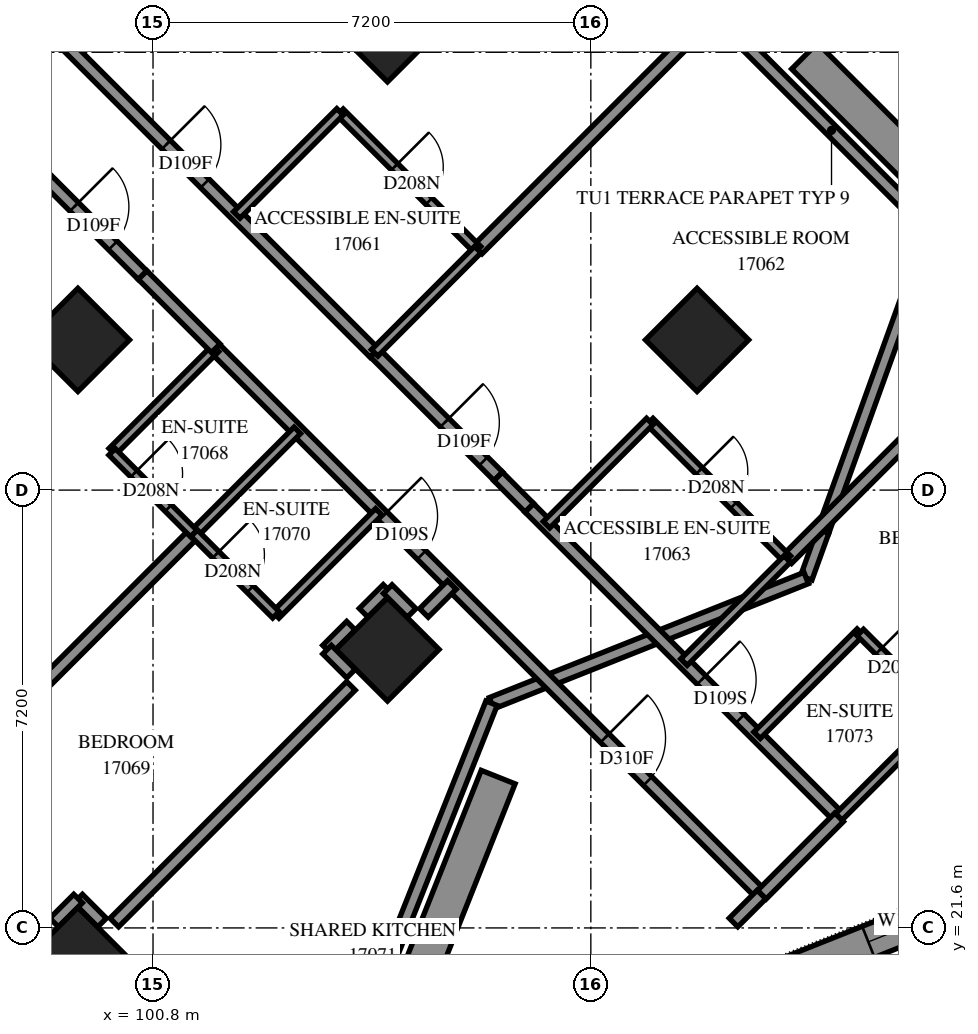
"""IFC4 building model, lengths in metres.
Left out: names, types, materials, properties, quantities, classifications, styles, units other than length and angle.
Written with IfcOpenShell. Run it as: python <this file> out.ifc"""

import sys

from ifc_helpers import new_model, si_unit, direction, frame, frame_2d, origin, origin_2d, place, context, subcontext, project, spatial, polyline, rectangle, outline, extrude, element, fill, save


model = new_model("IFC4")
c1 = context("Model", 3, precision=1e-05, world=origin(), true_north=direction((0.0, 1.0)))
c2 = subcontext(c1, "Body", "Model", "MODEL_VIEW")
j1 = project(units=[si_unit("LENGTHUNIT", "METRE"), si_unit("PLANEANGLEUNIT", "RADIAN")], contexts=[c1])
p1 = place(None, origin())
s1 = spatial("IfcSite", under=j1, at=p1, CompositionType="ELEMENT")
p2 = place(p1, origin())
s2 = spatial("IfcBuilding", under=s1, at=p2, CompositionType="ELEMENT")
p3 = place(p2, frame((0.0, 0.0, 64.4)))
s3 = spatial("IfcBuildingStorey", under=s2, at=p3, CompositionType="ELEMENT", Elevation=64.4)
for number, where, z_axis, x_axis in (
    (1, (104.656, 36.362, 0.0), (0.0, 0.0, 1.0), (0.707, -0.707, 0.0)),
    (2, (99.565, 31.271, 0.0), (0.0, 0.0, 1.0), (0.707, -0.707, 0.0)),
    (3, (109.747, 31.271, 0.0), (0.0, 0.0, 1.0), (0.707, -0.707, 0.0)),
    (4, (104.656, 26.18, 0.0), (0.0, 0.0, 1.0), (0.707, -0.707, 0.0)),
    (5, (99.565, 21.088, 0.0), (0.0, 0.0, 1.0), (0.707, -0.707, 0.0)),
):
    element("IfcColumn", number, at=place(p3, frame(where, z_axis=z_axis, x_axis=x_axis)), inside=s3, PredefinedType="COLUMN", context=c2, shape_type="SweptSolid", body=[
        extrude(rectangle(XDim=1.2, YDim=1.2, at=origin_2d()), origin(), (0.0, 0.0, 1.0), 3.1),
    ])
p4 = place(p3, frame((110.939, 20.724, 0.0), z_axis=(0.0, 0.0, 1.0), x_axis=(0.9291504333, 0.3697018694, 0.0)))
e6 = element("IfcWall", 6, at=p4, inside=s3, PredefinedType="SOLIDWALL", context=c2, shape_type="SweptSolid", body=[
    extrude(outline(polyline([(0.118, -0.275), (5.68, -0.275), (5.432, 0.275), (-0.118, 0.275), (0.118, -0.275)])), origin(), (0.0, 0.0, 1.0), 3.1),
])
p5 = place(p4, frame((1.749, 0.0, 0.7)))
e7 = element("IfcOpeningElement", 7, at=p5, cuts=e6, PredefinedType="OPENING", context=c2, shape_type="SweptSolid", body=[
    extrude(rectangle(XDim=1.8, YDim=2.0, at=frame_2d((0.9, 1.0))), frame((0.0, 0.285, 0.0), z_axis=(0.0, -1.0, 0.0), x_axis=(1.0, 0.0, 0.0)), (0.0, 0.0, 1.0), 0.57),
])
p6 = place(p3, frame((110.313, 36.362, 0.0), z_axis=(0.0, 0.0, 1.0), x_axis=(0.7070960376, -0.7071175246, 0.0)))
e8 = element("IfcWall", 8, at=p6, inside=s3, PredefinedType="PARAPET", context=c2, shape_type="SweptSolid", body=[
    extrude(outline(polyline([(-0.1, -0.1), (4.59, -0.1), (4.718, 0.1), (0.1, 0.1), (-0.1, -0.1)])), origin(), (0.0, 0.0, 1.0), 0.25),
])
p7 = place(p3, frame((113.239, 32.061, 0.0), z_axis=(0.0, 0.0, 1.0), x_axis=(-0.3392575143, -0.9406935415, 0.0)))
e9 = element("IfcWall", 9, at=p7, inside=s3, PredefinedType="PARAPET", context=c2, shape_type="SweptSolid", body=[
    extrude(outline(polyline([(0.0, -0.1), (4.185, -0.1), (4.185, 0.1), (0.0, 0.1), (0.0, -0.1)])), origin(), (0.0, 0.0, 1.0), 0.25),
])
p8 = place(p3, frame((111.819, 28.124, 0.0), z_axis=(0.0, 0.0, 1.0), x_axis=(-0.3392690321, -0.9406893876, 0.0)))
e10 = element("IfcWall", 10, at=p8, inside=s3, PredefinedType="PARAPET", context=c2, shape_type="SweptSolid", body=[
    extrude(outline(polyline([(0.0, -0.1), (0.773, -0.1), (0.863, 0.1), (0.0, 0.1), (0.0, -0.1)])), origin(), (0.0, 0.0, 1.0), 0.25),
])
p9 = place(p3, frame((111.542, 27.354, 0.0), z_axis=(0.0, 0.0, 1.0), x_axis=(-0.9291537819, -0.3696934536, 0.0)))
e11 = element("IfcWall", 11, at=p9, inside=s3, PredefinedType="PARAPET", context=c2, shape_type="SweptSolid", body=[
    extrude(outline(polyline([(0.045, -0.1), (5.612, -0.1), (5.526, 0.1), (-0.045, 0.1), (0.045, -0.1)])), origin(), (0.0, 0.0, 1.0), 0.25),
])
p10 = place(p3, frame((106.367, 25.295, 0.0), z_axis=(0.0, 0.0, 1.0), x_axis=(-0.3696779509, -0.92915995, 0.0)))
e12 = element("IfcWall", 12, at=p10, inside=s3, PredefinedType="PARAPET", context=c2, shape_type="SweptSolid", body=[
    extrude(outline(polyline([(-0.043, -0.1), (5.524, -0.1), (5.614, 0.1), (0.043, 0.1), (-0.043, -0.1)])), origin(), (0.0, 0.0, 1.0), 0.25),
])
p11 = place(p3, frame((111.515, 35.938, 0.0), z_axis=(0.0, 0.0, 1.0), x_axis=(0.7070914108, -0.7071221512, 0.0)))
e13 = element("IfcWall", 13, at=p11, inside=s3, PredefinedType="SOLIDWALL", context=c2, shape_type="SweptSolid", body=[
    extrude(rectangle(XDim=3.253, YDim=0.6, at=frame_2d((1.627, 0.0))), origin(), (0.0, 0.0, 1.0), 0.65),
])
p12 = place(p3, frame((106.476, 24.081, 0.0), z_axis=(0.0, 0.0, 1.0), x_axis=(-0.369669248, -0.9291634125, 0.0)))
e14 = element("IfcWall", 14, at=p12, inside=s3, PredefinedType="SOLIDWALL", context=c2, shape_type="SweptSolid", body=[
    extrude(rectangle(XDim=4.128, YDim=0.6, at=frame_2d((2.064, 0.0))), origin(), (0.0, 0.0, 1.0), 0.65),
])
p13 = place(p3, frame((101.825, 31.125, 0.0), z_axis=(0.0, 0.0, 1.0), x_axis=(0.7071067812, -0.7071067812, 0.0)))
e15 = element("IfcWall", 15, at=p13, inside=s3, PredefinedType="PARTITIONING", context=c2, shape_type="SweptSolid", body=[
    extrude(rectangle(XDim=12.7, YDim=0.2, at=frame_2d((6.35, 0.0))), origin(), (0.0, 0.0, 1.0), 3.1),
])
p14 = place(p13, frame((3.895, 0.0, 0.0)))
e16 = element("IfcOpeningElement", 16, at=p14, cuts=e15, PredefinedType="OPENING", context=c2, shape_type="SweptSolid", body=[
    extrude(rectangle(XDim=0.9, YDim=2.1, at=frame_2d((0.45, 1.05))), frame((0.0, 0.11, 0.0), z_axis=(0.0, -1.0, 0.0), x_axis=(1.0, 0.0, 0.0)), (0.0, 0.0, 1.0), 0.22),
])
p15 = place(p13, frame((9.056, 0.0, 0.0)))
e17 = element("IfcOpeningElement", 17, at=p15, cuts=e15, PredefinedType="OPENING", context=c2, shape_type="SweptSolid", body=[
    extrude(rectangle(XDim=1.0, YDim=2.1, at=frame_2d((0.5, 1.05))), frame((0.0, 0.11, 0.0), z_axis=(0.0, -1.0, 0.0), x_axis=(1.0, 0.0, 0.0)), (0.0, 0.0, 1.0), 0.22),
])
p16 = place(p3, frame((106.14, 32.756, 0.0), z_axis=(0.0, 0.0, 1.0), x_axis=(0.7071017366, 0.7071118258, 0.0)))
e18 = element("IfcWall", 18, at=p16, inside=s3, PredefinedType="PARTITIONING", context=c2, shape_type="SweptSolid", body=[
    extrude(rectangle(XDim=9.912, YDim=0.2, at=frame_2d((4.956, 0.0))), origin(), (0.0, 0.0, 1.0), 3.1),
])
p17 = place(p3, frame((99.349, 36.147, 0.0), z_axis=(0.0, 0.0, 1.0), x_axis=(0.7071067812, -0.7071067812, 0.0)))
e19 = element("IfcWall", 19, at=p17, inside=s3, PredefinedType="PARTITIONING", context=c2, shape_type="SweptSolid", body=[
    extrude(rectangle(XDim=7.201, YDim=0.2, at=frame_2d((3.601, 0.0))), origin(), (0.0, 0.0, 1.0), 3.1),
])
p18 = place(p17, frame((2.358, 0.0, 0.0)))
e20 = element("IfcOpeningElement", 20, at=p18, cuts=e19, PredefinedType="OPENING", context=c2, shape_type="SweptSolid", body=[
    extrude(rectangle(XDim=0.9, YDim=2.1, at=frame_2d((0.45, 1.05))), frame((0.0, 0.11, 0.0), z_axis=(0.0, -1.0, 0.0), x_axis=(1.0, 0.0, 0.0)), (0.0, 0.0, 1.0), 0.22),
])
p19 = place(p3, frame((106.987, 28.509, 0.0), z_axis=(0.0, 0.0, 1.0), x_axis=(0.7071067812, -0.7071067812, 0.0)))
e21 = element("IfcWall", 21, at=p19, inside=s3, PredefinedType="PARTITIONING", context=c2, shape_type="SweptSolid", body=[
    extrude(rectangle(XDim=7.198, YDim=0.2, at=frame_2d((3.599, 0.0))), origin(), (0.0, 0.0, 1.0), 3.1),
])
p20 = place(p19, frame((4.004, 0.0, 0.0)))
e22 = element("IfcOpeningElement", 22, at=p20, cuts=e21, PredefinedType="OPENING", context=c2, shape_type="SweptSolid", body=[
    extrude(rectangle(XDim=0.9, YDim=2.1, at=frame_2d((0.45, 1.05))), frame((0.0, 0.11, 0.0), z_axis=(0.0, -1.0, 0.0), x_axis=(1.0, 0.0, 0.0)), (0.0, 0.0, 1.0), 0.22),
])
p21 = place(p3, frame((96.517, 23.134, 0.0), z_axis=(0.0, 0.0, 1.0), x_axis=(0.7071139158, 0.7070996465, 0.0)))
e23 = element("IfcWall", 23, at=p21, inside=s3, PredefinedType="PARTITIONING", context=c2, shape_type="SweptSolid", body=[
    extrude(rectangle(XDim=7.008, YDim=0.2, at=frame_2d((3.504, 0.0))), origin(), (0.0, 0.0, 1.0), 3.1),
])
p22 = place(p3, frame((100.163, 21.689, 0.0), z_axis=(0.0, 0.0, 1.0), x_axis=(0.7071067812, 0.7071067812, 0.0)))
e24 = element("IfcWall", 24, at=p22, inside=s3, PredefinedType="PARTITIONING", context=c2, shape_type="SweptSolid", body=[
    extrude(rectangle(XDim=5.504, YDim=0.2, at=frame_2d((2.752, 0.0))), origin(), (0.0, 0.0, 1.0), 2.6),
])
p23 = place(p3, frame((111.231, 27.665, 0.0), z_axis=(0.0, 0.0, 1.0), x_axis=(0.7071067812, 0.7071067812, 0.0)))
e25 = element("IfcWall", 25, at=p23, inside=s3, PredefinedType="PARTITIONING", context=c2, shape_type="SweptSolid", body=[
    extrude(rectangle(XDim=4.55, YDim=0.2, at=frame_2d((2.275, 0.0))), origin(), (0.0, 0.0, 1.0), 3.1),
])
p24 = place(p3, frame((98.082, 34.879, 0.0), z_axis=(0.0, 0.0, 1.0), x_axis=(0.7073845681, -0.7068288851, 0.0)))
e26 = element("IfcWall", 26, at=p24, inside=s3, PredefinedType="PARTITIONING", context=c2, shape_type="SweptSolid", body=[
    extrude(rectangle(XDim=3.599, YDim=0.2, at=frame_2d((1.8, 0.0))), origin(), (0.0, 0.0, 1.0), 3.1),
])
p25 = place(p24, frame((2.009, 0.0, 0.0)))
e27 = element("IfcOpeningElement", 27, at=p25, cuts=e26, PredefinedType="OPENING", context=c2, shape_type="SweptSolid", body=[
    extrude(rectangle(XDim=0.9, YDim=2.1, at=frame_2d((0.45, 1.05))), frame((0.0, 0.11, 0.0), z_axis=(0.0, -1.0, 0.0), x_axis=(1.0, 0.0, 0.0)), (0.0, 0.0, 1.0), 0.22),
])
p26 = place(p3, frame((108.97, 29.928, 0.0), z_axis=(0.0, 0.0, 1.0), x_axis=(0.7067942478, -0.7074191764, 0.0)))
e28 = element("IfcWall", 28, at=p26, inside=s3, PredefinedType="PARTITIONING", context=c2, shape_type="SweptSolid", body=[
    extrude(rectangle(XDim=3.2, YDim=0.15, at=frame_2d((1.6, 0.0))), origin(), (0.0, 0.0, 1.0), 3.1),
])
p27 = place(p26, frame((1.148, 0.0, 0.0)))
e29 = element("IfcOpeningElement", 29, at=p27, cuts=e28, PredefinedType="OPENING", context=c2, shape_type="SweptSolid", body=[
    extrude(rectangle(XDim=0.8, YDim=2.1, at=frame_2d((0.4, 1.05))), frame((0.0, 0.085, 0.0), z_axis=(0.0, -1.0, 0.0), x_axis=(1.0, 0.0, 0.0)), (0.0, 0.0, 1.0), 0.17),
])
p28 = place(p3, frame((103.875, 35.015, 0.0), z_axis=(0.0, 0.0, 1.0), x_axis=(0.7071067812, -0.7071067812, 0.0)))
e30 = element("IfcWall", 30, at=p28, inside=s3, PredefinedType="PARTITIONING", context=c2, shape_type="SweptSolid", body=[
    extrude(rectangle(XDim=3.199, YDim=0.15, at=frame_2d((1.599, 0.0))), origin(), (0.0, 0.0, 1.0), 3.1),
])
p29 = place(p28, frame((1.27, 0.0, 0.0)))
e31 = element("IfcOpeningElement", 31, at=p29, cuts=e30, PredefinedType="OPENING", context=c2, shape_type="SweptSolid", body=[
    extrude(rectangle(XDim=0.8, YDim=2.1, at=frame_2d((0.4, 1.05))), frame((0.0, 0.085, 0.0), z_axis=(0.0, -1.0, 0.0), x_axis=(1.0, 0.0, 0.0)), (0.0, 0.0, 1.0), 0.17),
])
p30 = place(p3, frame((104.445, 31.059, 0.0), z_axis=(0.0, 0.0, 1.0), x_axis=(0.7074545101, -0.7067588812, 0.0)))
e32 = element("IfcWall", 32, at=p30, inside=s3, PredefinedType="PARTITIONING", context=c2, shape_type="SweptSolid", body=[
    extrude(rectangle(XDim=2.875, YDim=0.2, at=frame_2d((1.438, 0.0))), origin(), (0.0, 0.0, 1.0), 3.1),
])
p31 = place(p30, frame((1.626, 0.0, 0.0)))
e33 = element("IfcOpeningElement", 33, at=p31, cuts=e32, PredefinedType="OPENING", context=c2, shape_type="SweptSolid", body=[
    extrude(rectangle(XDim=0.9, YDim=2.1, at=frame_2d((0.45, 1.05))), frame((0.0, 0.11, 0.0), z_axis=(0.0, -1.0, 0.0), x_axis=(1.0, 0.0, 0.0)), (0.0, 0.0, 1.0), 0.22),
])
for number, where, z_axis, x_axis in (
    (34, (107.271, 28.231, 0.0), (0.0, 0.0, 1.0), (0.707, 0.707, 0.0)),
    (35, (100.129, 29.433, 0.0), (0.0, 0.0, 1.0), (0.707, 0.707, 0.0)),
):
    element("IfcWall", number, at=place(p3, frame(where, z_axis=z_axis, x_axis=x_axis)), inside=s3, PredefinedType="PARTITIONING", context=c2, shape_type="SweptSolid", body=[
        extrude(rectangle(XDim=2.401, YDim=0.15, at=frame_2d((1.201, 0.0))), origin(), (0.0, 0.0, 1.0), 3.1),
    ])
for number, where, z_axis, x_axis in (
    (36, (104.445, 31.057, 0.0), (0.0, 0.0, 1.0), (0.707, 0.708, 0.0)),
    (37, (112.077, 23.425, 0.0), (0.0, 0.0, 1.0), (0.708, 0.707, 0.0)),
    (38, (101.477, 28.085, 0.0), (0.0, 0.0, 1.0), (0.707, 0.708, 0.0)),
    (39, (102.177, 33.325, 0.0), (0.0, 0.0, 1.0), (0.708, 0.707, 0.0)),
    (40, (109.531, 25.971, 0.0), (0.0, 0.0, 1.0), (0.708, 0.707, 0.0)),
    (41, (110.734, 24.768, 0.0), (0.0, 0.0, 1.0), (0.708, 0.707, 0.0)),
):
    element("IfcWall", number, at=place(p3, frame(where, z_axis=z_axis, x_axis=x_axis)), inside=s3, PredefinedType="PARTITIONING", context=c2, shape_type="SweptSolid", body=[
        extrude(rectangle(XDim=2.4, YDim=0.15, at=frame_2d((1.2, 0.0))), origin(), (0.0, 0.0, 1.0), 3.1),
    ])
p32 = place(p3, frame((102.817, 26.747, 0.0), z_axis=(0.0, 0.0, 1.0), x_axis=(0.7071067812, 0.7071067812, 0.0)))
e42 = element("IfcWall", 42, at=p32, inside=s3, PredefinedType="PARTITIONING", context=c2, shape_type="SweptSolid", body=[
    extrude(rectangle(XDim=2.398, YDim=0.15, at=frame_2d((1.199, 0.0))), origin(), (0.0, 0.0, 1.0), 3.1),
])
p33 = place(p3, frame((100.127, 29.429, 0.0), z_axis=(0.0, 0.0, 1.0), x_axis=(0.7071067812, -0.7071067812, 0.0)))
e43 = element("IfcWall", 43, at=p33, inside=s3, PredefinedType="PARTITIONING", context=c2, shape_type="SweptSolid", body=[
    extrude(rectangle(XDim=1.901, YDim=0.15, at=frame_2d((0.95, 0.0))), origin(), (0.0, 0.0, 1.0), 3.1),
])
p34 = place(p33, frame((0.508, 0.0, 0.0)))
e44 = element("IfcOpeningElement", 44, at=p34, cuts=e43, PredefinedType="OPENING", context=c2, shape_type="SweptSolid", body=[
    extrude(rectangle(XDim=0.8, YDim=2.1, at=frame_2d((0.4, 1.05))), frame((0.0, 0.085, 0.0), z_axis=(0.0, -1.0, 0.0), x_axis=(1.0, 0.0, 0.0)), (0.0, 0.0, 1.0), 0.17),
])
p35 = place(p3, frame((112.431, 26.459, 0.0), z_axis=(0.0, 0.0, 1.0), x_axis=(0.7071067812, -0.7071067812, 0.0)))
e45 = element("IfcWall", 45, at=p35, inside=s3, PredefinedType="PARTITIONING", context=c2, shape_type="SweptSolid", body=[
    extrude(rectangle(XDim=1.901, YDim=0.15, at=frame_2d((0.95, 0.0))), origin(), (0.0, 0.0, 1.0), 3.1),
])
p36 = place(p35, frame((0.431, 0.0, 0.0)))
e46 = element("IfcOpeningElement", 46, at=p36, cuts=e45, PredefinedType="OPENING", context=c2, shape_type="SweptSolid", body=[
    extrude(rectangle(XDim=0.8, YDim=2.1, at=frame_2d((0.4, 1.05))), frame((0.0, 0.085, 0.0), z_axis=(0.0, -1.0, 0.0), x_axis=(1.0, 0.0, 0.0)), (0.0, 0.0, 1.0), 0.17),
])
p37 = place(p3, frame((101.477, 28.091, 0.0), z_axis=(0.0, 0.0, 1.0), x_axis=(0.7076330979, -0.7065800724, 0.0)))
e47 = element("IfcWall", 47, at=p37, inside=s3, PredefinedType="PARTITIONING", context=c2, shape_type="SweptSolid", body=[
    extrude(rectangle(XDim=1.899, YDim=0.15, at=frame_2d((0.95, 0.0))), origin(), (0.0, 0.0, 1.0), 3.1),
])
p38 = place(p37, frame((0.501, 0.0, 0.0)))
e48 = element("IfcOpeningElement", 48, at=p38, cuts=e47, PredefinedType="OPENING", context=c2, shape_type="SweptSolid", body=[
    extrude(rectangle(XDim=0.8, YDim=2.1, at=frame_2d((0.4, 1.05))), frame((0.0, 0.085, 0.0), z_axis=(0.0, -1.0, 0.0), x_axis=(1.0, 0.0, 0.0)), (0.0, 0.0, 1.0), 0.17),
])
p39 = place(p3, frame((110.811, 22.145, 0.0), z_axis=(0.0, 0.0, 1.0), x_axis=(0.7065510983, 0.7076620277, 0.0)))
e49 = element("IfcWall", 49, at=p39, inside=s3, PredefinedType="PARTITIONING", context=c2, shape_type="SweptSolid", body=[
    extrude(rectangle(XDim=1.8, YDim=0.2, at=frame_2d((0.9, 0.0))), origin(), (0.0, 0.0, 1.0), 3.1),
])
p40 = place(p3, frame((100.629, 32.335, 0.0), z_axis=(0.0, 0.0, 1.0), x_axis=(0.7071067812, -0.7071067812, 0.0)))
e50 = element("IfcWall", 50, at=p40, inside=s3, PredefinedType="PARTITIONING", context=c2, shape_type="SweptSolid", body=[
    extrude(rectangle(XDim=1.7, YDim=0.2, at=frame_2d((0.85, 0.0))), origin(), (0.0, 0.0, 1.0), 3.1),
])
p41 = place(p3, frame((106.476, 29.024, 0.0), z_axis=(0.0, 0.0, 1.0), x_axis=(0.7057270646, -0.7084838109, 0.0)))
e51 = element("IfcWall", 51, at=p41, inside=s3, PredefinedType="PARTITIONING", context=c2, shape_type="SweptSolid", body=[
    extrude(rectangle(XDim=0.726, YDim=0.2, at=frame_2d((0.363, 0.0))), origin(), (0.0, 0.0, 1.0), 3.1),
])
p42 = place(p3, frame((110.347, 21.689, 0.0), z_axis=(0.0, 0.0, 1.0), x_axis=(0.7071067812, 0.7071067812, 0.0)))
e52 = element("IfcWall", 52, at=p42, inside=s3, PredefinedType="PARTITIONING", context=c2, shape_type="SweptSolid", body=[
    extrude(rectangle(XDim=0.65, YDim=0.2, at=frame_2d((0.325, 0.0))), origin(), (0.0, 0.0, 1.0), 3.1),
])
p43 = place(p3, frame((105.255, 26.781, 0.0), z_axis=(0.0, 0.0, 1.0), x_axis=(0.7071067812, 0.7071067812, 0.0)))
e53 = element("IfcWall", 53, at=p43, inside=s3, PredefinedType="PARTITIONING", context=c2, shape_type="SweptSolid", body=[
    extrude(rectangle(XDim=0.65, YDim=0.2, at=frame_2d((0.325, 0.0))), origin(), (0.0, 0.0, 1.0), 2.6),
])
for number, where, z_axis, x_axis in (
    (54, (99.568, 22.082, 0.0), (0.0, 0.0, 1.0), (0.707, -0.707, 0.0)),
    (55, (99.173, 21.689, 0.0), (0.0, 0.0, 1.0), (0.707, 0.707, 0.0)),
    (56, (103.661, 26.177, 0.0), (0.0, 0.0, 1.0), (0.707, 0.707, 0.0)),
    (57, (103.662, 26.177, 0.0), (0.0, 0.0, 1.0), (0.707, -0.707, 0.0)),
):
    element("IfcWall", number, at=place(p3, frame(where, z_axis=z_axis, x_axis=x_axis)), inside=s3, PredefinedType="PARTITIONING", context=c2, shape_type="SweptSolid", body=[
        extrude(rectangle(XDim=0.557, YDim=0.2, at=frame_2d((0.279, 0.0))), origin(), (0.0, 0.0, 1.0), 3.1),
    ])
p44 = place(p3, frame((104.263, 26.784, 0.0), z_axis=(0.0, 0.0, 1.0), x_axis=(0.7089037401, 0.705305244, 0.0)))
e58 = element("IfcWall", 58, at=p44, inside=s3, PredefinedType="PARTITIONING", context=c2, shape_type="SweptSolid", body=[
    extrude(rectangle(XDim=0.556, YDim=0.2, at=frame_2d((0.278, 0.0))), origin(), (0.0, 0.0, 1.0), 3.1),
])
p45 = place(p3, frame((104.66, 27.172, 0.0), z_axis=(0.0, 0.0, 1.0), x_axis=(0.7071067812, -0.7071067812, 0.0)))
e59 = element("IfcWall", 59, at=p45, inside=s3, PredefinedType="PARTITIONING", context=c2, shape_type="SweptSolid", body=[
    extrude(rectangle(XDim=0.554, YDim=0.2, at=frame_2d((0.277, 0.0))), origin(), (0.0, 0.0, 1.0), 3.1),
])
p46 = place(p5, origin())
e60 = element("IfcWindow", 60, at=p46, inside=s3, PartitioningType="SINGLE_PANEL", PredefinedType="WINDOW", context=c2, shape_type="SweptSolid", body=[
    extrude(rectangle(XDim=1.8, YDim=2.0, at=frame_2d((0.9, 1.0))), frame((0.0, 0.155, 0.0), z_axis=(0.0, -1.0, 0.0), x_axis=(1.0, 0.0, 0.0)), (0.0, 0.0, 1.0), 0.06),
])
fill(e7, e60)
p47 = place(p18, origin())
e61 = element("IfcDoor", 61, at=p47, inside=s3, OperationType="SINGLE_SWING_RIGHT", PredefinedType="DOOR", context=c2, shape_type="SweptSolid", body=[
    extrude(rectangle(XDim=0.9, YDim=2.1, at=frame_2d((0.45, 1.05))), frame((0.0, 0.025, 0.0), z_axis=(0.0, -1.0, 0.0), x_axis=(1.0, 0.0, 0.0)), (0.0, 0.0, 1.0), 0.05),
])
fill(e20, e61)
p48 = place(p29, origin())
e62 = element("IfcDoor", 62, at=p48, inside=s3, OperationType="SINGLE_SWING_RIGHT", PredefinedType="DOOR", context=c2, shape_type="SweptSolid", body=[
    extrude(rectangle(XDim=0.8, YDim=2.1, at=frame_2d((0.4, 1.05))), frame((0.0, 0.025, 0.0), z_axis=(0.0, -1.0, 0.0), x_axis=(1.0, 0.0, 0.0)), (0.0, 0.0, 1.0), 0.05),
])
fill(e31, e62)
p49 = place(p31, origin())
e63 = element("IfcDoor", 63, at=p49, inside=s3, OperationType="SINGLE_SWING_RIGHT", PredefinedType="DOOR", context=c2, shape_type="SweptSolid", body=[
    extrude(rectangle(XDim=0.9, YDim=2.1, at=frame_2d((0.45, 1.05))), frame((0.0, 0.025, 0.0), z_axis=(0.0, -1.0, 0.0), x_axis=(1.0, 0.0, 0.0)), (0.0, 0.0, 1.0), 0.05),
])
fill(e33, e63)
p50 = place(p27, origin())
e64 = element("IfcDoor", 64, at=p50, inside=s3, OperationType="SINGLE_SWING_RIGHT", PredefinedType="DOOR", context=c2, shape_type="SweptSolid", body=[
    extrude(rectangle(XDim=0.8, YDim=2.1, at=frame_2d((0.4, 1.05))), frame((0.0, 0.025, 0.0), z_axis=(0.0, -1.0, 0.0), x_axis=(1.0, 0.0, 0.0)), (0.0, 0.0, 1.0), 0.05),
])
fill(e29, e64)
p51 = place(p25, origin())
e65 = element("IfcDoor", 65, at=p51, inside=s3, OperationType="SINGLE_SWING_LEFT", PredefinedType="DOOR", context=c2, shape_type="SweptSolid", body=[
    extrude(rectangle(XDim=0.9, YDim=2.1, at=frame_2d((0.45, 1.05))), frame((0.0, 0.025, 0.0), z_axis=(0.0, -1.0, 0.0), x_axis=(1.0, 0.0, 0.0)), (0.0, 0.0, 1.0), 0.05),
])
fill(e27, e65)
p52 = place(p34, origin())
e66 = element("IfcDoor", 66, at=p52, inside=s3, OperationType="SINGLE_SWING_RIGHT", PredefinedType="DOOR", context=c2, shape_type="SweptSolid", body=[
    extrude(rectangle(XDim=0.8, YDim=2.1, at=frame_2d((0.4, 1.05))), frame((0.0, 0.025, 0.0), z_axis=(0.0, -1.0, 0.0), x_axis=(1.0, 0.0, 0.0)), (0.0, 0.0, 1.0), 0.05),
])
fill(e44, e66)
p53 = place(p14, origin())
e67 = element("IfcDoor", 67, at=p53, inside=s3, OperationType="SINGLE_SWING_LEFT", PredefinedType="DOOR", context=c2, shape_type="SweptSolid", body=[
    extrude(rectangle(XDim=0.9, YDim=2.1, at=frame_2d((0.45, 1.05))), frame((0.0, 0.025, 0.0), z_axis=(0.0, -1.0, 0.0), x_axis=(1.0, 0.0, 0.0)), (0.0, 0.0, 1.0), 0.05),
])
fill(e16, e67)
p54 = place(p38, origin())
e68 = element("IfcDoor", 68, at=p54, inside=s3, OperationType="SINGLE_SWING_RIGHT", PredefinedType="DOOR", context=c2, shape_type="SweptSolid", body=[
    extrude(rectangle(XDim=0.8, YDim=2.1, at=frame_2d((0.4, 1.05))), frame((0.0, 0.025, 0.0), z_axis=(0.0, -1.0, 0.0), x_axis=(1.0, 0.0, 0.0)), (0.0, 0.0, 1.0), 0.05),
])
fill(e48, e68)
p55 = place(p15, origin())
e69 = element("IfcDoor", 69, at=p55, inside=s3, OperationType="SINGLE_SWING_RIGHT", PredefinedType="DOOR", context=c2, shape_type="SweptSolid", body=[
    extrude(rectangle(XDim=1.0, YDim=2.1, at=frame_2d((0.5, 1.05))), frame((0.0, 0.025, 0.0), z_axis=(0.0, -1.0, 0.0), x_axis=(1.0, 0.0, 0.0)), (0.0, 0.0, 1.0), 0.05),
])
fill(e17, e69)
p56 = place(p20, origin())
e70 = element("IfcDoor", 70, at=p56, inside=s3, OperationType="SINGLE_SWING_RIGHT", PredefinedType="DOOR", context=c2, shape_type="SweptSolid", body=[
    extrude(rectangle(XDim=0.9, YDim=2.1, at=frame_2d((0.45, 1.05))), frame((0.0, 0.025, 0.0), z_axis=(0.0, -1.0, 0.0), x_axis=(1.0, 0.0, 0.0)), (0.0, 0.0, 1.0), 0.05),
])
fill(e22, e70)
p57 = place(p36, origin())
e71 = element("IfcDoor", 71, at=p57, inside=s3, OperationType="SINGLE_SWING_RIGHT", PredefinedType="DOOR", context=c2, shape_type="SweptSolid", body=[
    extrude(rectangle(XDim=0.8, YDim=2.1, at=frame_2d((0.4, 1.05))), frame((0.0, 0.025, 0.0), z_axis=(0.0, -1.0, 0.0), x_axis=(1.0, 0.0, 0.0)), (0.0, 0.0, 1.0), 0.05),
])
fill(e46, e71)
save(model, sys.argv[1])
